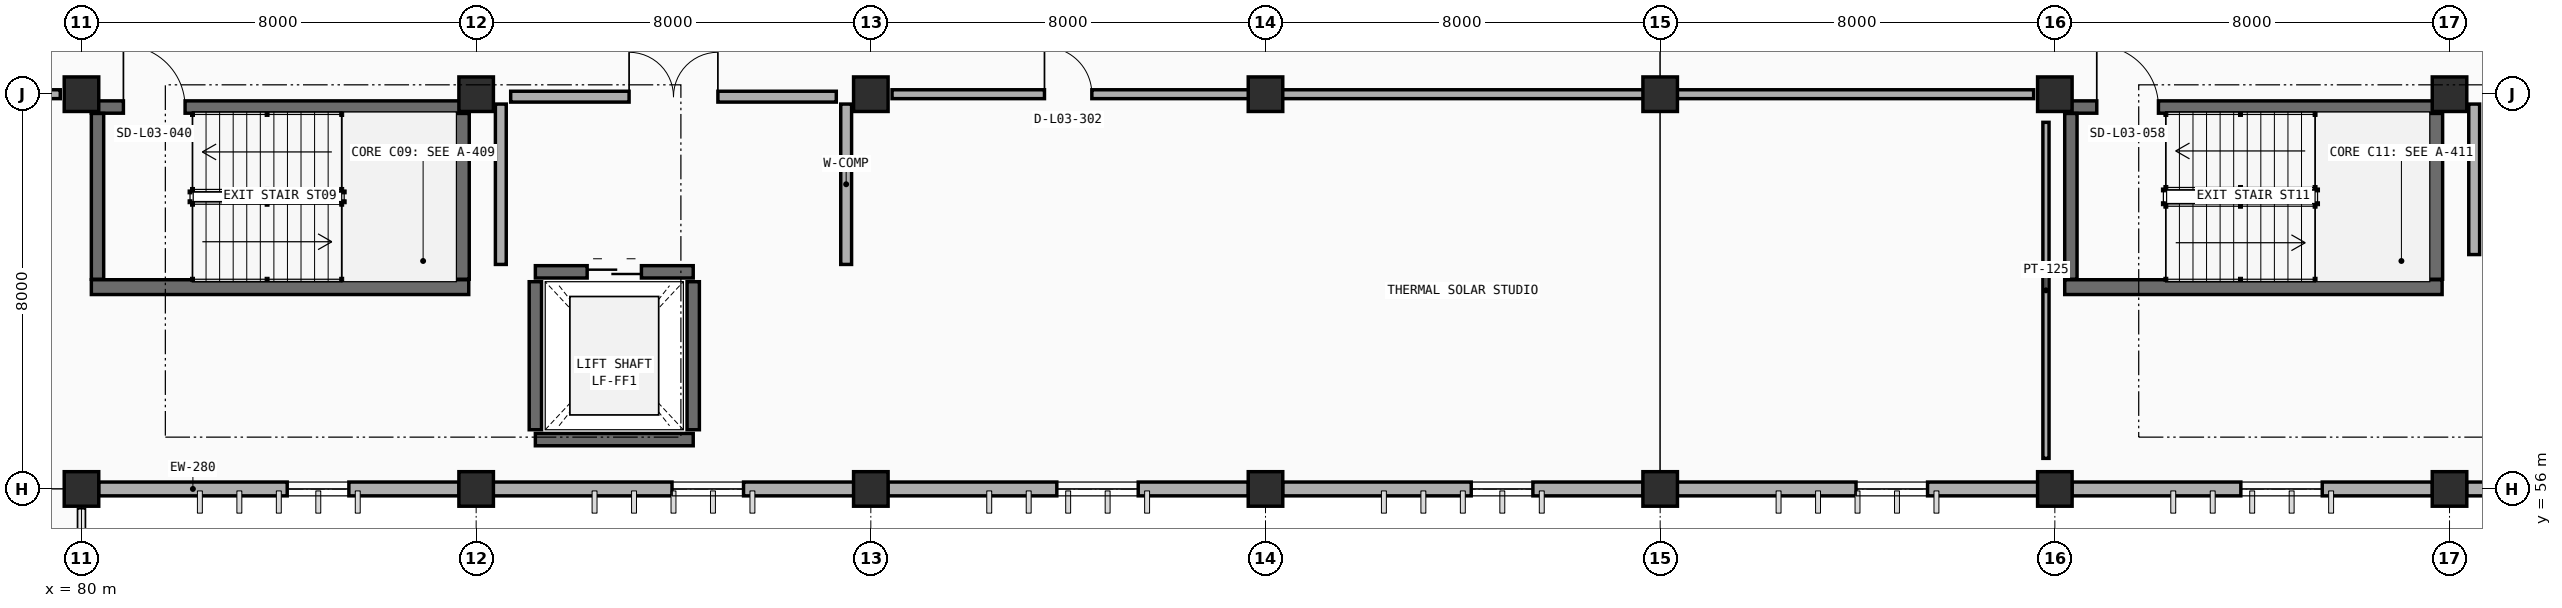
"""IFC4 building model, lengths in metres.
Left out: names, types, materials, properties, quantities, classifications, styles, units other than length and angle.
Written with IfcOpenShell. Run it as: python <this file> out.ifc"""

import sys

from ifc_helpers import new_model, si_unit, direction, frame, frame_2d, origin, origin_2d, place, context, subcontext, project, spatial, rectangle, extrude, element, fill, save


model = new_model("IFC4")
c1 = context("Model", 3, precision=1e-05, world=origin(), true_north=direction((0.0, 1.0)))
c2 = subcontext(c1, "Body", "Model", "MODEL_VIEW")
j1 = project(units=[si_unit("LENGTHUNIT", "METRE"), si_unit("PLANEANGLEUNIT", "RADIAN")], contexts=[c1])
p1 = place(None, origin())
s1 = spatial("IfcSite", under=j1, at=p1, CompositionType="ELEMENT")
p2 = place(p1, origin())
s2 = spatial("IfcBuilding", under=s1, at=p2, CompositionType="ELEMENT")
p3 = place(p2, frame((0.0, 0.0, 9.6)))
s3 = spatial("IfcBuildingStorey", under=s2, at=p3, CompositionType="ELEMENT", Elevation=9.6)
for number, where, z_axis, x_axis in (
    (1, (80.0, 56.0, 0.0), (0.0, 0.0, 1.0), (1.0, 0.0, 0.0)),
    (2, (88.0, 56.0, 0.0), (0.0, 0.0, 1.0), (1.0, 0.0, 0.0)),
    (3, (96.0, 56.0, 0.0), (0.0, 0.0, 1.0), (1.0, 0.0, 0.0)),
    (4, (104.0, 56.0, 0.0), (0.0, 0.0, 1.0), (1.0, 0.0, 0.0)),
    (5, (112.0, 56.0, 0.0), (0.0, 0.0, 1.0), (1.0, 0.0, 0.0)),
    (6, (120.0, 56.0, 0.0), (0.0, 0.0, 1.0), (1.0, 0.0, 0.0)),
    (7, (128.0, 56.0, 0.0), (0.0, 0.0, 1.0), (1.0, 0.0, 0.0)),
    (8, (80.0, 64.0, 0.0), (0.0, 0.0, 1.0), (1.0, 0.0, 0.0)),
    (9, (88.0, 64.0, 0.0), (0.0, 0.0, 1.0), (1.0, 0.0, 0.0)),
    (10, (96.0, 64.0, 0.0), (0.0, 0.0, 1.0), (1.0, 0.0, 0.0)),
    (11, (104.0, 64.0, 0.0), (0.0, 0.0, 1.0), (1.0, 0.0, 0.0)),
    (12, (112.0, 64.0, 0.0), (0.0, 0.0, 1.0), (1.0, 0.0, 0.0)),
    (13, (120.0, 64.0, 0.0), (0.0, 0.0, 1.0), (1.0, 0.0, 0.0)),
    (14, (128.0, 64.0, 0.0), (0.0, 0.0, 1.0), (1.0, 0.0, 0.0)),
):
    element("IfcColumn", number, at=place(p3, frame(where, z_axis=z_axis, x_axis=x_axis)), inside=s3, PredefinedType="COLUMN", context=c2, shape_type="SweptSolid", body=[
        extrude(rectangle(XDim=0.7, YDim=0.7, at=origin_2d()), origin(), (0.0, 0.0, 1.0), 4.2),
    ])
p4 = place(p3, frame((87.653, 56.0, 0.0), z_axis=(0.0, 0.0, 1.0), x_axis=(-1.0, 0.0, 0.0)))
e15 = element("IfcWall", 15, at=p4, inside=s3, PredefinedType="STANDARD", context=c2, shape_type="SweptSolid", body=[
    extrude(rectangle(XDim=7.306, YDim=0.28, at=frame_2d((3.653, 0.0))), origin(), (0.0, 0.0, 1.0), 3.325),
])
p5 = place(p4, frame((2.233, 0.0, 0.9)))
e16 = element("IfcOpeningElement", 16, at=p5, cuts=e15, PredefinedType="OPENING", context=c2, shape_type="SweptSolid", body=[
    extrude(rectangle(XDim=1.25, YDim=2.0, at=frame_2d((0.625, 1.0))), frame((0.0, 0.15, 0.0), z_axis=(0.0, -1.0, 0.0), x_axis=(1.0, 0.0, 0.0)), (0.0, 0.0, 1.0), 0.3),
])
p6 = place(p3, frame((95.653, 56.0, 0.0), z_axis=(0.0, 0.0, 1.0), x_axis=(-1.0, 0.0, 0.0)))
e17 = element("IfcWall", 17, at=p6, inside=s3, PredefinedType="STANDARD", context=c2, shape_type="SweptSolid", body=[
    extrude(rectangle(XDim=7.306, YDim=0.28, at=frame_2d((3.653, 0.0))), origin(), (0.0, 0.0, 1.0), 3.325),
])
p7 = place(p6, frame((2.233, 0.0, 0.9)))
e18 = element("IfcOpeningElement", 18, at=p7, cuts=e17, PredefinedType="OPENING", context=c2, shape_type="SweptSolid", body=[
    extrude(rectangle(XDim=1.45, YDim=2.0, at=frame_2d((0.725, 1.0))), frame((0.0, 0.15, 0.0), z_axis=(0.0, -1.0, 0.0), x_axis=(1.0, 0.0, 0.0)), (0.0, 0.0, 1.0), 0.3),
])
p8 = place(p3, frame((103.653, 56.0, 0.0), z_axis=(0.0, 0.0, 1.0), x_axis=(-1.0, 0.0, 0.0)))
e19 = element("IfcWall", 19, at=p8, inside=s3, PredefinedType="STANDARD", context=c2, shape_type="SweptSolid", body=[
    extrude(rectangle(XDim=7.306, YDim=0.28, at=frame_2d((3.653, 0.0))), origin(), (0.0, 0.0, 1.0), 3.325),
])
p9 = place(p8, frame((2.233, 0.0, 0.9)))
e20 = element("IfcOpeningElement", 20, at=p9, cuts=e19, PredefinedType="OPENING", context=c2, shape_type="SweptSolid", body=[
    extrude(rectangle(XDim=1.65, YDim=2.0, at=frame_2d((0.825, 1.0))), frame((0.0, 0.15, 0.0), z_axis=(0.0, -1.0, 0.0), x_axis=(1.0, 0.0, 0.0)), (0.0, 0.0, 1.0), 0.3),
])
p10 = place(p3, frame((111.653, 56.0, 0.0), z_axis=(0.0, 0.0, 1.0), x_axis=(-1.0, 0.0, 0.0)))
e21 = element("IfcWall", 21, at=p10, inside=s3, PredefinedType="STANDARD", context=c2, shape_type="SweptSolid", body=[
    extrude(rectangle(XDim=7.306, YDim=0.28, at=frame_2d((3.653, 0.0))), origin(), (0.0, 0.0, 1.0), 3.325),
])
p11 = place(p10, frame((2.233, 0.0, 0.9)))
e22 = element("IfcOpeningElement", 22, at=p11, cuts=e21, PredefinedType="OPENING", context=c2, shape_type="SweptSolid", body=[
    extrude(rectangle(XDim=1.25, YDim=2.0, at=frame_2d((0.625, 1.0))), frame((0.0, 0.15, 0.0), z_axis=(0.0, -1.0, 0.0), x_axis=(1.0, 0.0, 0.0)), (0.0, 0.0, 1.0), 0.3),
])
p12 = place(p3, frame((119.653, 56.0, 0.0), z_axis=(0.0, 0.0, 1.0), x_axis=(-1.0, 0.0, 0.0)))
e23 = element("IfcWall", 23, at=p12, inside=s3, PredefinedType="STANDARD", context=c2, shape_type="SweptSolid", body=[
    extrude(rectangle(XDim=7.306, YDim=0.28, at=frame_2d((3.653, 0.0))), origin(), (0.0, 0.0, 1.0), 3.325),
])
p13 = place(p12, frame((2.233, 0.0, 0.9)))
e24 = element("IfcOpeningElement", 24, at=p13, cuts=e23, PredefinedType="OPENING", context=c2, shape_type="SweptSolid", body=[
    extrude(rectangle(XDim=1.45, YDim=2.0, at=frame_2d((0.725, 1.0))), frame((0.0, 0.15, 0.0), z_axis=(0.0, -1.0, 0.0), x_axis=(1.0, 0.0, 0.0)), (0.0, 0.0, 1.0), 0.3),
])
p14 = place(p3, frame((127.653, 56.0, 0.0), z_axis=(0.0, 0.0, 1.0), x_axis=(-1.0, 0.0, 0.0)))
e25 = element("IfcWall", 25, at=p14, inside=s3, PredefinedType="STANDARD", context=c2, shape_type="SweptSolid", body=[
    extrude(rectangle(XDim=7.306, YDim=0.28, at=frame_2d((3.653, 0.0))), origin(), (0.0, 0.0, 1.0), 3.325),
])
p15 = place(p14, frame((2.233, 0.0, 0.9)))
e26 = element("IfcOpeningElement", 26, at=p15, cuts=e25, PredefinedType="OPENING", context=c2, shape_type="SweptSolid", body=[
    extrude(rectangle(XDim=1.65, YDim=2.0, at=frame_2d((0.825, 1.0))), frame((0.0, 0.15, 0.0), z_axis=(0.0, -1.0, 0.0), x_axis=(1.0, 0.0, 0.0)), (0.0, 0.0, 1.0), 0.3),
])
p16 = place(p3, frame((135.653, 56.0, 0.0), z_axis=(0.0, 0.0, 1.0), x_axis=(-1.0, 0.0, 0.0)))
e27 = element("IfcWall", 27, at=p16, inside=s3, PredefinedType="STANDARD", context=c2, shape_type="SweptSolid", body=[
    extrude(rectangle(XDim=7.306, YDim=0.28, at=frame_2d((3.653, 0.0))), origin(), (0.0, 0.0, 1.0), 3.325),
])
p17 = place(p16, frame((2.233, 0.0, 0.9)))
e28 = element("IfcOpeningElement", 28, at=p17, cuts=e27, PredefinedType="OPENING", context=c2, shape_type="SweptSolid", body=[
    extrude(rectangle(XDim=1.25, YDim=2.0, at=frame_2d((0.625, 1.0))), frame((0.0, 0.15, 0.0), z_axis=(0.0, -1.0, 0.0), x_axis=(1.0, 0.0, 0.0)), (0.0, 0.0, 1.0), 0.3),
])
p18 = place(p3, frame((80.2, 60.09, 0.0), z_axis=(0.0, 0.0, 1.0), x_axis=(1.0, 0.0, 0.0)))
e29 = element("IfcWall", 29, at=p18, inside=s3, PredefinedType="SHEAR", context=c2, shape_type="SweptSolid", body=[
    extrude(rectangle(XDim=7.65, YDim=0.3, at=frame_2d((3.825, 0.0))), origin(), (0.0, 0.0, 1.0), 4.2),
])
p19 = place(p3, frame((87.71, 60.25, 0.0), z_axis=(0.0, 0.0, 1.0), x_axis=(0.0, 1.0, 0.0)))
e30 = element("IfcWall", 30, at=p19, inside=s3, PredefinedType="SHEAR", context=c2, shape_type="SweptSolid", body=[
    extrude(rectangle(XDim=3.36, YDim=0.3, at=frame_2d((1.68, 0.0))), origin(), (0.0, 0.0, 1.0), 4.2),
])
p20 = place(p3, frame((80.2, 63.74, 0.0), z_axis=(0.0, 0.0, 1.0), x_axis=(1.0, 0.0, 0.0)))
e31 = element("IfcWall", 31, at=p20, inside=s3, PredefinedType="SOLIDWALL", context=c2, shape_type="SweptSolid", body=[
    extrude(rectangle(XDim=7.65, YDim=0.25, at=frame_2d((3.825, 0.0))), origin(), (0.0, 0.0, 1.0), 4.2),
])
p21 = place(p20, frame((0.65, 0.0, 0.0)))
e32 = element("IfcOpeningElement", 32, at=p21, cuts=e31, PredefinedType="OPENING", context=c2, shape_type="SweptSolid", body=[
    extrude(rectangle(XDim=1.25, YDim=2.15, at=frame_2d((0.625, 1.075))), frame((0.0, 0.135, 0.0), z_axis=(0.0, -1.0, 0.0), x_axis=(1.0, 0.0, 0.0)), (0.0, 0.0, 1.0), 0.27),
])
p22 = place(p3, frame((80.325, 60.25, 0.0), z_axis=(0.0, 0.0, 1.0), x_axis=(0.0, 1.0, 0.0)))
e33 = element("IfcWall", 33, at=p22, inside=s3, PredefinedType="SOLIDWALL", context=c2, shape_type="SweptSolid", body=[
    extrude(rectangle(XDim=3.36, YDim=0.25, at=frame_2d((1.68, 0.0))), origin(), (0.0, 0.0, 1.0), 4.2),
])
p23 = place(p3, frame((120.2, 60.09, 0.0), z_axis=(0.0, 0.0, 1.0), x_axis=(1.0, 0.0, 0.0)))
e34 = element("IfcWall", 34, at=p23, inside=s3, PredefinedType="SHEAR", context=c2, shape_type="SweptSolid", body=[
    extrude(rectangle(XDim=7.65, YDim=0.3, at=frame_2d((3.825, 0.0))), origin(), (0.0, 0.0, 1.0), 4.2),
])
p24 = place(p3, frame((127.71, 60.25, 0.0), z_axis=(0.0, 0.0, 1.0), x_axis=(0.0, 1.0, 0.0)))
e35 = element("IfcWall", 35, at=p24, inside=s3, PredefinedType="SHEAR", context=c2, shape_type="SweptSolid", body=[
    extrude(rectangle(XDim=3.36, YDim=0.3, at=frame_2d((1.68, 0.0))), origin(), (0.0, 0.0, 1.0), 4.2),
])
p25 = place(p3, frame((120.2, 63.74, 0.0), z_axis=(0.0, 0.0, 1.0), x_axis=(1.0, 0.0, 0.0)))
e36 = element("IfcWall", 36, at=p25, inside=s3, PredefinedType="SOLIDWALL", context=c2, shape_type="SweptSolid", body=[
    extrude(rectangle(XDim=7.65, YDim=0.25, at=frame_2d((3.825, 0.0))), origin(), (0.0, 0.0, 1.0), 4.2),
])
p26 = place(p25, frame((0.65, 0.0, 0.0)))
e37 = element("IfcOpeningElement", 37, at=p26, cuts=e36, PredefinedType="OPENING", context=c2, shape_type="SweptSolid", body=[
    extrude(rectangle(XDim=1.25, YDim=2.15, at=frame_2d((0.625, 1.075))), frame((0.0, 0.135, 0.0), z_axis=(0.0, -1.0, 0.0), x_axis=(1.0, 0.0, 0.0)), (0.0, 0.0, 1.0), 0.27),
])
p27 = place(p3, frame((120.325, 60.25, 0.0), z_axis=(0.0, 0.0, 1.0), x_axis=(0.0, 1.0, 0.0)))
e38 = element("IfcWall", 38, at=p27, inside=s3, PredefinedType="SOLIDWALL", context=c2, shape_type="SweptSolid", body=[
    extrude(rectangle(XDim=3.36, YDim=0.25, at=frame_2d((1.68, 0.0))), origin(), (0.0, 0.0, 1.0), 4.2),
])
p28 = place(p3, frame((89.2, 57.0, 0.0), z_axis=(0.0, 0.0, 1.0), x_axis=(1.0, 0.0, 0.0)))
e39 = element("IfcWall", 39, at=p28, inside=s3, PredefinedType="SOLIDWALL", context=c2, shape_type="SweptSolid", body=[
    extrude(rectangle(XDim=3.2, YDim=0.25, at=frame_2d((1.6, 0.0))), origin(), (0.0, 0.0, 1.0), 4.2),
])
p29 = place(p3, frame((89.2, 60.4, 0.0), z_axis=(0.0, 0.0, 1.0), x_axis=(1.0, 0.0, 0.0)))
e40 = element("IfcWall", 40, at=p29, inside=s3, PredefinedType="SOLIDWALL", context=c2, shape_type="SweptSolid", body=[
    extrude(rectangle(XDim=3.2, YDim=0.25, at=frame_2d((1.6, 0.0))), origin(), (0.0, 0.0, 1.0), 4.2),
])
p30 = place(p29, frame((1.05, 0.0, 0.0)))
e41 = element("IfcOpeningElement", 41, at=p30, cuts=e40, PredefinedType="OPENING", context=c2, shape_type="SweptSolid", body=[
    extrude(rectangle(XDim=1.1, YDim=2.15, at=frame_2d((0.55, 1.075))), frame((0.0, 0.135, 0.0), z_axis=(0.0, -1.0, 0.0), x_axis=(1.0, 0.0, 0.0)), (0.0, 0.0, 1.0), 0.27),
])
for number, where, z_axis, x_axis in (
    (42, (89.2, 57.2, 0.0), (0.0, 0.0, 1.0), (0.0, 1.0, 0.0)),
    (43, (92.4, 57.2, 0.0), (0.0, 0.0, 1.0), (0.0, 1.0, 0.0)),
):
    element("IfcWall", number, at=place(p3, frame(where, z_axis=z_axis, x_axis=x_axis)), inside=s3, PredefinedType="SOLIDWALL", context=c2, shape_type="SweptSolid", body=[
        extrude(rectangle(XDim=3.0, YDim=0.25, at=frame_2d((1.5, 0.0))), origin(), (0.0, 0.0, 1.0), 4.2),
    ])
p31 = place(p3, frame((88.7, 63.95, 0.0), z_axis=(0.0, 0.0, 1.0), x_axis=(1.0, 0.0, 0.0)))
e44 = element("IfcWall", 44, at=p31, inside=s3, PredefinedType="PARTITIONING", context=c2, shape_type="SweptSolid", body=[
    extrude(rectangle(XDim=6.6, YDim=0.22, at=frame_2d((3.3, 0.0))), origin(), (0.0, 0.0, 1.0), 3.275),
])
p32 = place(p31, frame((2.4, 0.0, 0.0)))
e45 = element("IfcOpeningElement", 45, at=p32, cuts=e44, PredefinedType="OPENING", context=c2, shape_type="SweptSolid", body=[
    extrude(rectangle(XDim=1.8, YDim=2.2, at=frame_2d((0.9, 1.1))), frame((0.0, 0.12, 0.0), z_axis=(0.0, -1.0, 0.0), x_axis=(1.0, 0.0, 0.0)), (0.0, 0.0, 1.0), 0.24),
])
for number, where, z_axis, x_axis in (
    (46, (88.5, 60.55, 0.0), (0.0, 0.0, 1.0), (0.0, 1.0, 0.0)),
    (47, (95.5, 60.55, 0.0), (0.0, 0.0, 1.0), (0.0, 1.0, 0.0)),
):
    element("IfcWall", number, at=place(p3, frame(where, z_axis=z_axis, x_axis=x_axis)), inside=s3, PredefinedType="PARTITIONING", context=c2, shape_type="SweptSolid", body=[
        extrude(rectangle(XDim=3.25, YDim=0.22, at=frame_2d((1.625, 0.0))), origin(), (0.0, 0.0, 1.0), 3.225),
    ])
p33 = place(p3, frame((128.5, 60.75, 0.0), z_axis=(0.0, 0.0, 1.0), x_axis=(0.0, 1.0, 0.0)))
e48 = element("IfcWall", 48, at=p33, inside=s3, PredefinedType="PARTITIONING", context=c2, shape_type="SweptSolid", body=[
    extrude(rectangle(XDim=3.05, YDim=0.22, at=frame_2d((1.525, 0.0))), origin(), (0.0, 0.0, 1.0), 3.225),
])
p34 = place(p3, frame((56.43, 64.0, 0.0), z_axis=(0.0, 0.0, 1.0), x_axis=(1.0, 0.0, 0.0)))
e49 = element("IfcWall", 49, at=p34, inside=s3, PredefinedType="PARTITIONING", context=c2, shape_type="SweptSolid", body=[
    extrude(rectangle(XDim=23.14, YDim=0.18, at=frame_2d((11.57, 0.0))), origin(), (0.0, 0.0, 1.0), 3.275),
])
p35 = place(p34, frame((2.96, 0.0, 0.0)))
e50 = element("IfcOpeningElement", 50, at=p35, cuts=e49, PredefinedType="OPENING", context=c2, shape_type="SweptSolid", body=[
    extrude(rectangle(XDim=1.22, YDim=2.18, at=frame_2d((0.61, 1.09))), frame((0.0, 0.1, 0.0), z_axis=(0.0, -1.0, 0.0), x_axis=(1.0, 0.0, 0.0)), (0.0, 0.0, 1.0), 0.2),
])
p36 = place(p3, frame((96.43, 64.0, 0.0), z_axis=(0.0, 0.0, 1.0), x_axis=(1.0, 0.0, 0.0)))
e51 = element("IfcWall", 51, at=p36, inside=s3, PredefinedType="PARTITIONING", context=c2, shape_type="SweptSolid", body=[
    extrude(rectangle(XDim=23.14, YDim=0.18, at=frame_2d((11.57, 0.0))), origin(), (0.0, 0.0, 1.0), 3.275),
])
p37 = place(p36, frame((3.09, 0.0, 0.0)))
e52 = element("IfcOpeningElement", 52, at=p37, cuts=e51, PredefinedType="OPENING", context=c2, shape_type="SweptSolid", body=[
    extrude(rectangle(XDim=0.96, YDim=2.15, at=frame_2d((0.48, 1.075))), frame((0.0, 0.1, 0.0), z_axis=(0.0, -1.0, 0.0), x_axis=(1.0, 0.0, 0.0)), (0.0, 0.0, 1.0), 0.2),
])
p38 = place(p3, frame((119.82, 56.62, 0.0), z_axis=(0.0, 0.0, 1.0), x_axis=(0.0, 1.0, 0.0)))
e53 = element("IfcWall", 53, at=p38, inside=s3, PredefinedType="PARTITIONING", context=c2, shape_type="SweptSolid", body=[
    extrude(rectangle(XDim=6.81, YDim=0.125, at=frame_2d((3.405, 0.0))), origin(), (0.0, 0.0, 1.0), 3.225),
])
p39 = place(p5, origin())
e54 = element("IfcWindow", 54, at=p39, inside=s3, PartitioningType="SINGLE_PANEL", PredefinedType="WINDOW", context=c2, shape_type="SweptSolid", body=[
    extrude(rectangle(XDim=1.25, YDim=2.0, at=frame_2d((0.625, 1.0))), frame((0.0, 0.03, 0.0), z_axis=(0.0, -1.0, 0.0), x_axis=(1.0, 0.0, 0.0)), (0.0, 0.0, 1.0), 0.06),
])
fill(e16, e54)
p40 = place(p7, origin())
e55 = element("IfcWindow", 55, at=p40, inside=s3, PartitioningType="SINGLE_PANEL", PredefinedType="WINDOW", context=c2, shape_type="SweptSolid", body=[
    extrude(rectangle(XDim=1.45, YDim=2.0, at=frame_2d((0.725, 1.0))), frame((0.0, 0.03, 0.0), z_axis=(0.0, -1.0, 0.0), x_axis=(1.0, 0.0, 0.0)), (0.0, 0.0, 1.0), 0.06),
])
fill(e18, e55)
p41 = place(p9, origin())
e56 = element("IfcWindow", 56, at=p41, inside=s3, PartitioningType="DOUBLE_PANEL_VERTICAL", PredefinedType="WINDOW", context=c2, shape_type="SweptSolid", body=[
    extrude(rectangle(XDim=1.65, YDim=2.0, at=frame_2d((0.825, 1.0))), frame((0.0, 0.03, 0.0), z_axis=(0.0, -1.0, 0.0), x_axis=(1.0, 0.0, 0.0)), (0.0, 0.0, 1.0), 0.06),
])
fill(e20, e56)
p42 = place(p11, origin())
e57 = element("IfcWindow", 57, at=p42, inside=s3, PartitioningType="SINGLE_PANEL", PredefinedType="WINDOW", context=c2, shape_type="SweptSolid", body=[
    extrude(rectangle(XDim=1.25, YDim=2.0, at=frame_2d((0.625, 1.0))), frame((0.0, 0.03, 0.0), z_axis=(0.0, -1.0, 0.0), x_axis=(1.0, 0.0, 0.0)), (0.0, 0.0, 1.0), 0.06),
])
fill(e22, e57)
p43 = place(p13, origin())
e58 = element("IfcWindow", 58, at=p43, inside=s3, PartitioningType="SINGLE_PANEL", PredefinedType="WINDOW", context=c2, shape_type="SweptSolid", body=[
    extrude(rectangle(XDim=1.45, YDim=2.0, at=frame_2d((0.725, 1.0))), frame((0.0, 0.03, 0.0), z_axis=(0.0, -1.0, 0.0), x_axis=(1.0, 0.0, 0.0)), (0.0, 0.0, 1.0), 0.06),
])
fill(e24, e58)
p44 = place(p15, origin())
e59 = element("IfcWindow", 59, at=p44, inside=s3, PartitioningType="DOUBLE_PANEL_VERTICAL", PredefinedType="WINDOW", context=c2, shape_type="SweptSolid", body=[
    extrude(rectangle(XDim=1.65, YDim=2.0, at=frame_2d((0.825, 1.0))), frame((0.0, 0.03, 0.0), z_axis=(0.0, -1.0, 0.0), x_axis=(1.0, 0.0, 0.0)), (0.0, 0.0, 1.0), 0.06),
])
fill(e26, e59)
p45 = place(p21, origin())
e60 = element("IfcDoor", 60, at=p45, inside=s3, OperationType="SINGLE_SWING_LEFT", PredefinedType="DOOR", context=c2, shape_type="SweptSolid", body=[
    extrude(rectangle(XDim=1.25, YDim=2.15, at=frame_2d((0.625, 1.075))), frame((0.0, 0.025, 0.0), z_axis=(0.0, -1.0, 0.0), x_axis=(1.0, 0.0, 0.0)), (0.0, 0.0, 1.0), 0.05),
])
fill(e32, e60)
p46 = place(p26, origin())
e61 = element("IfcDoor", 61, at=p46, inside=s3, OperationType="SINGLE_SWING_LEFT", PredefinedType="DOOR", context=c2, shape_type="SweptSolid", body=[
    extrude(rectangle(XDim=1.25, YDim=2.15, at=frame_2d((0.625, 1.075))), frame((0.0, 0.025, 0.0), z_axis=(0.0, -1.0, 0.0), x_axis=(1.0, 0.0, 0.0)), (0.0, 0.0, 1.0), 0.05),
])
fill(e37, e61)
p47 = place(p30, origin())
e62 = element("IfcDoor", 62, at=p47, inside=s3, OperationType="DOUBLE_DOOR_SLIDING", PredefinedType="DOOR", context=c2, shape_type="SweptSolid", body=[
    extrude(rectangle(XDim=1.1, YDim=2.15, at=frame_2d((0.55, 1.075))), frame((0.0, 0.025, 0.0), z_axis=(0.0, -1.0, 0.0), x_axis=(1.0, 0.0, 0.0)), (0.0, 0.0, 1.0), 0.05),
])
fill(e41, e62)
p48 = place(p32, origin())
e63 = element("IfcDoor", 63, at=p48, inside=s3, OperationType="DOUBLE_DOOR_SINGLE_SWING", PredefinedType="DOOR", context=c2, shape_type="SweptSolid", body=[
    extrude(rectangle(XDim=1.8, YDim=2.2, at=frame_2d((0.9, 1.1))), frame((0.0, 0.025, 0.0), z_axis=(0.0, -1.0, 0.0), x_axis=(1.0, 0.0, 0.0)), (0.0, 0.0, 1.0), 0.05),
])
fill(e45, e63)
p49 = place(p37, origin())
e64 = element("IfcDoor", 64, at=p49, inside=s3, OperationType="SINGLE_SWING_LEFT", PredefinedType="DOOR", context=c2, shape_type="SweptSolid", body=[
    extrude(rectangle(XDim=0.96, YDim=2.15, at=frame_2d((0.48, 1.075))), frame((0.0, 0.025, 0.0), z_axis=(0.0, -1.0, 0.0), x_axis=(1.0, 0.0, 0.0)), (0.0, 0.0, 1.0), 0.05),
])
fill(e52, e64)
save(model, sys.argv[1])
